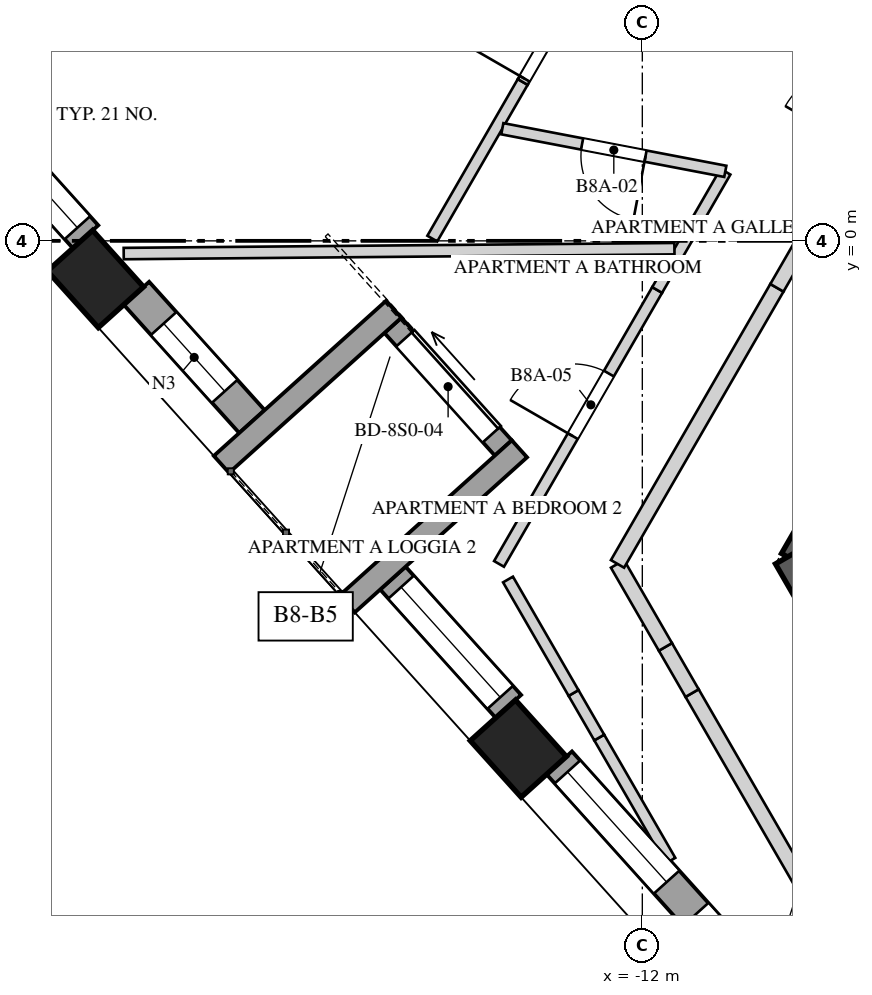
"""IFC4 building model, lengths in metres.
Left out: names, types, materials, properties, quantities, classifications, styles, units other than length and angle.
Written with IfcOpenShell. Run it as: python <this file> out.ifc"""

import sys

from ifc_helpers import new_model, si_unit, direction, frame, frame_2d, origin, origin_2d, place, context, subcontext, project, spatial, polyline, rectangle, outline, extrude, element, fill, save


model = new_model("IFC4")
c1 = context("Model", 3, precision=1e-05, world=origin(), true_north=direction((0.0, 1.0)))
c2 = subcontext(c1, "Body", "Model", "MODEL_VIEW")
j1 = project(units=[si_unit("LENGTHUNIT", "METRE"), si_unit("PLANEANGLEUNIT", "RADIAN")], contexts=[c1])
p1 = place(None, origin())
s1 = spatial("IfcSite", under=j1, at=p1, CompositionType="ELEMENT")
p2 = place(p1, origin())
s2 = spatial("IfcBuilding", under=s1, at=p2, CompositionType="ELEMENT")
p3 = place(p2, frame((0.0, 0.0, 320.4)))
s3 = spatial("IfcBuildingStorey", under=s2, at=p3, CompositionType="ELEMENT", Elevation=320.4)
p4 = place(p3, frame((-1.285, 10.725, 0.0), z_axis=(0.0, 0.0, 1.0), x_axis=(-0.499994590896, -0.86602852671, 0.0)))
e1 = element("IfcWall", 1, at=p4, inside=s3, PredefinedType="SHEAR", context=c2, shape_type="SweptSolid", body=[
    extrude(rectangle(XDim=17.292, YDim=0.55, at=frame_2d((8.646, 0.0))), origin(), (0.0, 0.0, 1.0), 4.0),
])
p5 = place(p4, frame((6.851, 0.0, 0.0)))
e2 = element("IfcOpeningElement", 2, at=p5, cuts=e1, PredefinedType="OPENING", context=c2, shape_type="SweptSolid", body=[
    extrude(rectangle(XDim=1.0, YDim=2.4, at=frame_2d((0.5, 1.2))), frame((0.0, 0.285, 0.0), z_axis=(0.0, -1.0, 0.0), x_axis=(1.0, 0.0, 0.0)), (0.0, 0.0, 1.0), 0.57),
])
p6 = place(p4, frame((15.089, 0.0, 0.0)))
e3 = element("IfcOpeningElement", 3, at=p6, cuts=e1, PredefinedType="OPENING", context=c2, shape_type="SweptSolid", body=[
    extrude(rectangle(XDim=0.8, YDim=2.1, at=frame_2d((0.4, 1.05))), frame((0.0, 0.285, 0.0), z_axis=(0.0, -1.0, 0.0), x_axis=(1.0, 0.0, 0.0)), (0.0, 0.0, 1.0), 0.57),
])
p7 = place(p3, frame((-10.01, -4.113, 0.0), z_axis=(0.0, 0.0, 1.0), x_axis=(0.499995765644, -0.866027848477, 0.0)))
e4 = element("IfcWall", 4, at=p7, inside=s3, PredefinedType="SHEAR", context=c2, shape_type="SweptSolid", body=[
    extrude(rectangle(XDim=2.887, YDim=0.55, at=frame_2d((1.443, 0.0))), origin(), (0.0, 0.0, 1.0), 4.0),
])
for number, where, z_axis, x_axis in (
    (5, (-19.195, -0.502, -0.35), (0.0, 0.0, 1.0), (0.669, -0.743, 0.0)),
    (6, (-13.631, -6.68, -0.35), (0.0, 0.0, 1.0), (0.669, -0.743, 0.0)),
):
    element("IfcColumn", number, at=place(p3, frame(where, z_axis=z_axis, x_axis=x_axis)), inside=s3, PredefinedType="COLUMN", context=c2, shape_type="SweptSolid", body=[
        extrude(rectangle(XDim=1.0, YDim=0.8, at=origin_2d()), origin(), (0.0, 0.0, 1.0), 4.35),
    ])
p8 = place(p3, frame((-20.844, 1.742, 0.0), z_axis=(0.0, 0.0, 1.0), x_axis=(0.669160694992, -0.743117732447, 0.0)))
e7 = element("IfcWall", 7, at=p8, inside=s3, PredefinedType="SOLIDWALL", context=c2, shape_type="SweptSolid", body=[
    extrude(rectangle(XDim=2.271, YDim=0.45, at=frame_2d((1.136, 0.0))), origin(), (0.0, 0.0, 1.0), 3.3),
])
p9 = place(p8, frame((0.161, 0.0, 0.4)))
e8 = element("IfcOpeningElement", 8, at=p9, cuts=e7, PredefinedType="OPENING", context=c2, shape_type="SweptSolid", body=[
    extrude(rectangle(XDim=1.95, YDim=2.75, at=frame_2d((0.975, 1.375))), frame((0.0, 0.235, 0.0), z_axis=(0.0, -1.0, 0.0), x_axis=(1.0, 0.0, 0.0)), (0.0, 0.0, 1.0), 0.47),
])
p10 = place(p3, frame((-18.656, -0.689, 0.0), z_axis=(0.0, 0.0, 1.0), x_axis=(0.669107243666, -0.743165860676, 0.0)))
e9 = element("IfcWall", 9, at=p10, inside=s3, PredefinedType="SOLIDWALL", context=c2, shape_type="SweptSolid", body=[
    extrude(rectangle(XDim=2.271, YDim=0.45, at=frame_2d((1.136, 0.0))), origin(), (0.0, 0.0, 1.0), 3.3),
])
p11 = place(p10, frame((0.536, 0.0, 0.4)))
e10 = element("IfcOpeningElement", 10, at=p11, cuts=e9, PredefinedType="OPENING", context=c2, shape_type="SweptSolid", body=[
    extrude(rectangle(XDim=1.2, YDim=2.75, at=frame_2d((0.6, 1.375))), frame((0.0, 0.235, 0.0), z_axis=(0.0, -1.0, 0.0), x_axis=(1.0, 0.0, 0.0)), (0.0, 0.0, 1.0), 0.47),
])
p12 = place(p3, frame((-15.281, -4.437, 0.0), z_axis=(0.0, 0.0, 1.0), x_axis=(0.669107243666, -0.743165860676, 0.0)))
e11 = element("IfcWall", 11, at=p12, inside=s3, PredefinedType="SOLIDWALL", context=c2, shape_type="SweptSolid", body=[
    extrude(rectangle(XDim=2.271, YDim=0.45, at=frame_2d((1.136, 0.0))), origin(), (0.0, 0.0, 1.0), 3.3),
])
p13 = place(p12, frame((0.161, 0.0, 0.4)))
e12 = element("IfcOpeningElement", 12, at=p13, cuts=e11, PredefinedType="OPENING", context=c2, shape_type="SweptSolid", body=[
    extrude(rectangle(XDim=1.95, YDim=2.75, at=frame_2d((0.975, 1.375))), frame((0.0, 0.235, 0.0), z_axis=(0.0, -1.0, 0.0), x_axis=(1.0, 0.0, 0.0)), (0.0, 0.0, 1.0), 0.47),
])
p14 = place(p3, frame((-13.093, -6.868, 0.0), z_axis=(0.0, 0.0, 1.0), x_axis=(0.669136224502, -0.74313976684, 0.0)))
e13 = element("IfcWall", 13, at=p14, inside=s3, PredefinedType="SOLIDWALL", context=c2, shape_type="SweptSolid", body=[
    extrude(rectangle(XDim=7.314, YDim=0.45, at=frame_2d((3.657, 0.0))), origin(), (0.0, 0.0, 1.0), 3.3),
])
p15 = place(p14, frame((0.161, 0.0, 0.4)))
e14 = element("IfcOpeningElement", 14, at=p15, cuts=e13, PredefinedType="OPENING", context=c2, shape_type="SweptSolid", body=[
    extrude(rectangle(XDim=1.95, YDim=2.75, at=frame_2d((0.975, 1.375))), frame((0.0, 0.235, 0.0), z_axis=(0.0, -1.0, 0.0), x_axis=(1.0, 0.0, 0.0)), (0.0, 0.0, 1.0), 0.47),
])
p16 = place(p14, frame((2.682, 0.0, 0.4)))
e15 = element("IfcOpeningElement", 15, at=p16, cuts=e13, PredefinedType="OPENING", context=c2, shape_type="SweptSolid", body=[
    extrude(rectangle(XDim=1.95, YDim=2.75, at=frame_2d((0.975, 1.375))), frame((0.0, 0.235, 0.0), z_axis=(0.0, -1.0, 0.0), x_axis=(1.0, 0.0, 0.0)), (0.0, 0.0, 1.0), 0.47),
])
p17 = place(p14, frame((5.203, 0.0, 0.4)))
e16 = element("IfcOpeningElement", 16, at=p17, cuts=e13, PredefinedType="OPENING", context=c2, shape_type="SweptSolid", body=[
    extrude(rectangle(XDim=1.95, YDim=2.75, at=frame_2d((0.975, 1.375))), frame((0.0, 0.235, 0.0), z_axis=(0.0, -1.0, 0.0), x_axis=(1.0, 0.0, 0.0)), (0.0, 0.0, 1.0), 0.47),
])
p18 = place(p3, frame((-21.447, 1.402, 0.0), z_axis=(0.0, 0.0, 1.0), x_axis=(0.743158802514, 0.669115082961, 0.0)))
e17 = element("IfcWall", 17, at=p18, inside=s3, PredefinedType="SOLIDWALL", context=c2, shape_type="SweptSolid", body=[
    extrude(rectangle(XDim=3.05, YDim=0.3, at=frame_2d((1.525, 0.0))), origin(), (0.0, 0.0, 1.0), 3.3),
])
p19 = place(p3, frame((-15.281, -1.111, 0.0), z_axis=(0.0, 0.0, 1.0), x_axis=(0.669144868344, -0.743131983681, 0.0)))
e18 = element("IfcWall", 18, at=p19, inside=s3, PredefinedType="SOLIDWALL", context=c2, shape_type="SweptSolid", body=[
    extrude(rectangle(XDim=2.171, YDim=0.3, at=frame_2d((1.085, 0.0))), origin(), (0.0, 0.0, 1.0), 3.3),
])
p20 = place(p19, frame((0.236, 0.0, 0.0)))
e19 = element("IfcOpeningElement", 19, at=p20, cuts=e18, PredefinedType="OPENING", context=c2, shape_type="SweptSolid", body=[
    extrude(rectangle(XDim=1.7, YDim=2.5, at=frame_2d((0.85, 1.25))), frame((0.0, 0.16, 0.0), z_axis=(0.0, -1.0, 0.0), x_axis=(1.0, 0.0, 0.0)), (0.0, 0.0, 1.0), 0.32),
])
p21 = place(p3, frame((-17.537, -2.94, 0.0), z_axis=(0.0, 0.0, 1.0), x_axis=(0.743118999127, 0.669159288314, 0.0)))
e20 = element("IfcWall", 20, at=p21, inside=s3, PredefinedType="SOLIDWALL", context=c2, shape_type="SweptSolid", body=[
    extrude(rectangle(XDim=3.05, YDim=0.3, at=frame_2d((1.525, 0.0))), origin(), (0.0, 0.0, 1.0), 3.3),
])
p22 = place(p3, frame((-15.883, -4.777, 0.0), z_axis=(0.0, 0.0, 1.0), x_axis=(0.743122960955, 0.669154888573, 0.0)))
e21 = element("IfcWall", 21, at=p22, inside=s3, PredefinedType="SOLIDWALL", context=c2, shape_type="SweptSolid", body=[
    extrude(rectangle(XDim=3.05, YDim=0.3, at=frame_2d((1.525, 0.0))), origin(), (0.0, 0.0, 1.0), 3.3),
])
p23 = place(p3, frame((-14.763, 0.03, 0.0), z_axis=(0.0, 0.0, 1.0), x_axis=(0.500045118629, 0.865999352965, 0.0)))
e22 = element("IfcWall", 22, at=p23, inside=s3, PredefinedType="PARTITIONING", context=c2, shape_type="SweptSolid", body=[
    extrude(rectangle(XDim=2.38, YDim=0.15, at=frame_2d((1.19, 0.0))), origin(), (0.0, 0.0, 1.0), 3.65),
])
p24 = place(p3, frame((-13.573, 2.09, 0.0), z_axis=(0.0, 0.0, 1.0), x_axis=(0.500026194733, 0.86601027972, 0.0)))
e23 = element("IfcWall", 23, at=p24, inside=s3, PredefinedType="PARTITIONING", context=c2, shape_type="SweptSolid", body=[
    extrude(outline(polyline([(0.0, 0.0), (1.392, 0.0), (1.392, 2.55), (0.474, 2.55), (0.474, 3.65), (0.0, 3.65), (0.0, 0.0)])), frame((0.0, 0.075, 0.0), z_axis=(0.0, -1.0, 0.0), x_axis=(1.0, 0.0, 0.0)), (0.0, 0.0, 1.0), 0.15),
])
p25 = place(p24, frame((0.05, 0.0, 0.0)))
e24 = element("IfcOpeningElement", 24, at=p25, cuts=e23, PredefinedType="OPENING", context=c2, shape_type="SweptSolid", body=[
    extrude(rectangle(XDim=0.95, YDim=2.4, at=frame_2d((0.475, 1.2))), frame((0.0, 0.085, 0.0), z_axis=(0.0, -1.0, 0.0), x_axis=(1.0, 0.0, 0.0)), (0.0, 0.0, 1.0), 0.17),
])
p26 = place(p3, frame((-13.885, -4.25, 0.0), z_axis=(0.0, 0.0, 1.0), x_axis=(0.499988236992, 0.866032195053, 0.0)))
e25 = element("IfcWall", 25, at=p26, inside=s3, PredefinedType="PARTITIONING", context=c2, shape_type="SweptSolid", body=[
    extrude(rectangle(XDim=4.161, YDim=0.15, at=frame_2d((2.081, 0.0))), origin(), (0.0, 0.0, 1.0), 3.65),
])
p27 = place(p26, frame((1.941, 0.0, 0.0)))
e26 = element("IfcOpeningElement", 26, at=p27, cuts=e25, PredefinedType="OPENING", context=c2, shape_type="SweptSolid", body=[
    extrude(rectangle(XDim=0.95, YDim=2.4, at=frame_2d((0.475, 1.2))), frame((0.0, 0.085, 0.0), z_axis=(0.0, -1.0, 0.0), x_axis=(1.0, 0.0, 0.0)), (0.0, 0.0, 1.0), 0.17),
])
p28 = place(p3, frame((-11.805, -0.646, 0.0), z_axis=(0.0, 0.0, 1.0), x_axis=(0.500185116612, 0.865918500276, 0.0)))
e27 = element("IfcWall", 27, at=p28, inside=s3, PredefinedType="PARTITIONING", context=c2, shape_type="SweptSolid", body=[
    extrude(rectangle(XDim=0.792, YDim=0.15, at=frame_2d((0.396, 0.0))), origin(), (0.0, 0.0, 1.0), 2.95),
])
p29 = place(p3, frame((-11.409, 0.039, 0.0), z_axis=(0.0, 0.0, 1.0), x_axis=(0.49984860601, 0.866112793503, 0.0)))
e28 = element("IfcWall", 28, at=p29, inside=s3, PredefinedType="PARTITIONING", context=c2, shape_type="SweptSolid", body=[
    extrude(rectangle(XDim=1.005, YDim=0.15, at=frame_2d((0.502, 0.0))), origin(), (0.0, 0.0, 1.0), 3.65),
])
p30 = place(p3, frame((-11.631, -8.155, 0.0), z_axis=(0.0, 0.0, 1.0), x_axis=(-0.50011020776, 0.865961765954, 0.0)))
e29 = element("IfcWall", 29, at=p30, inside=s3, PredefinedType="PARTITIONING", context=c2, shape_type="SweptSolid", body=[
    extrude(rectangle(XDim=1.871, YDim=0.15, at=frame_2d((0.936, 0.0))), origin(), (0.0, 0.0, 1.0), 3.65),
])
p31 = place(p3, frame((-12.567, -6.534, 0.0), z_axis=(0.0, 0.0, 1.0), x_axis=(-0.499826590014, 0.866125498941, 0.0)))
e30 = element("IfcWall", 30, at=p31, inside=s3, PredefinedType="PARTITIONING", context=c2, shape_type="SweptSolid", body=[
    extrude(rectangle(XDim=0.677, YDim=0.15, at=frame_2d((0.338, 0.0))), origin(), (0.0, 0.0, 1.0), 2.95),
])
p32 = place(p3, frame((-12.905, -5.948, 0.0), z_axis=(0.0, 0.0, 1.0), x_axis=(-0.499992114976, 0.866029956157, 0.0)))
e31 = element("IfcWall", 31, at=p32, inside=s3, PredefinedType="PARTITIONING", context=c2, shape_type="SweptSolid", body=[
    extrude(rectangle(XDim=1.724, YDim=0.15, at=frame_2d((0.862, 0.0))), origin(), (0.0, 0.0, 1.0), 3.65),
])
p33 = place(p3, frame((-11.577, -0.103, 0.0), z_axis=(0.0, 0.0, 1.0), x_axis=(-0.999960434916, -0.008895425913, 0.0)))
e32 = element("IfcWall", 32, at=p33, inside=s3, PredefinedType="PARTITIONING", context=c2, shape_type="SweptSolid", body=[
    extrude(rectangle(XDim=7.246, YDim=0.15, at=frame_2d((3.623, 0.0))), origin(), (0.0, 0.0, 1.0), 2.95),
])
p34 = place(p3, frame((-10.908, 0.914, 0.0), z_axis=(0.0, 0.0, 1.0), x_axis=(-0.982214575518, 0.187761890809, 0.0)))
e33 = element("IfcWall", 33, at=p34, inside=s3, PredefinedType="PARTITIONING", context=c2, shape_type="SweptSolid", body=[
    extrude(rectangle(XDim=2.987, YDim=0.15, at=frame_2d((1.493, 0.0))), origin(), (0.0, 0.0, 1.0), 3.65),
])
p35 = place(p34, frame((1.068, 0.0, 0.0)))
e34 = element("IfcOpeningElement", 34, at=p35, cuts=e33, PredefinedType="OPENING", context=c2, shape_type="SweptSolid", body=[
    extrude(rectangle(XDim=0.85, YDim=2.4, at=frame_2d((0.425, 1.2))), frame((0.0, 0.085, 0.0), z_axis=(0.0, -1.0, 0.0), x_axis=(1.0, 0.0, 0.0)), (0.0, 0.0, 1.0), 0.17),
])
p36 = place(p3, frame((-9.844, -8.55, 0.0), z_axis=(0.0, 0.0, 1.0), x_axis=(-0.500003959331, 0.866023117852, 0.0)))
e35 = element("IfcWall", 35, at=p36, inside=s3, PredefinedType="SOLIDWALL", context=c2, shape_type="SweptSolid", body=[
    extrude(rectangle(XDim=3.003, YDim=0.2, at=frame_2d((1.501, 0.0))), origin(), (0.0, 0.0, 1.0), 3.65),
])
p37 = place(p3, frame((-11.345, -5.949, 0.0), z_axis=(0.0, 0.0, 1.0), x_axis=(-0.499993523031, 0.866029143232, 0.0)))
e36 = element("IfcWall", 36, at=p37, inside=s3, PredefinedType="SOLIDWALL", context=c2, shape_type="SweptSolid", body=[
    extrude(rectangle(XDim=0.702, YDim=0.2, at=frame_2d((0.351, 0.0))), origin(), (0.0, 0.0, 1.0), 2.95),
])
p38 = place(p3, frame((-11.696, -5.342, 0.0), z_axis=(0.0, 0.0, 1.0), x_axis=(-0.500013012896, 0.866017890655, 0.0)))
e37 = element("IfcWall", 37, at=p38, inside=s3, PredefinedType="SOLIDWALL", context=c2, shape_type="SweptSolid", body=[
    extrude(rectangle(XDim=1.261, YDim=0.2, at=frame_2d((0.63, 0.0))), origin(), (0.0, 0.0, 1.0), 3.65),
])
p39 = place(p3, frame((-12.326, -4.25, 0.0), z_axis=(0.0, 0.0, 1.0), x_axis=(0.499982771656, 0.866035350345, 0.0)))
e38 = element("IfcWall", 38, at=p39, inside=s3, PredefinedType="SOLIDWALL", context=c2, shape_type="SweptSolid", body=[
    extrude(rectangle(XDim=4.195, YDim=0.2, at=frame_2d((2.097, 0.0))), origin(), (0.0, 0.0, 1.0), 3.65),
])
p40 = place(p3, frame((-10.229, -0.617, 0.0), z_axis=(0.0, 0.0, 1.0), x_axis=(0.5001686003, 0.865928040471, 0.0)))
e39 = element("IfcWall", 39, at=p40, inside=s3, PredefinedType="SOLIDWALL", context=c2, shape_type="SweptSolid", body=[
    extrude(rectangle(XDim=0.821, YDim=0.2, at=frame_2d((0.411, 0.0))), origin(), (0.0, 0.0, 1.0), 2.95),
])
p41 = place(p9, origin())
e40 = element("IfcWindow", 40, at=p41, inside=s3, PartitioningType="SINGLE_PANEL", PredefinedType="WINDOW", context=c2, shape_type="SweptSolid", body=[
    extrude(rectangle(XDim=1.95, YDim=2.75, at=frame_2d((0.975, 1.375))), frame((0.0, 0.03, 0.0), z_axis=(0.0, -1.0, 0.0), x_axis=(1.0, 0.0, 0.0)), (0.0, 0.0, 1.0), 0.06),
])
fill(e8, e40)
p42 = place(p11, origin())
e41 = element("IfcWindow", 41, at=p42, inside=s3, PartitioningType="SINGLE_PANEL", PredefinedType="WINDOW", context=c2, shape_type="SweptSolid", body=[
    extrude(rectangle(XDim=1.2, YDim=2.75, at=frame_2d((0.6, 1.375))), frame((0.0, 0.03, 0.0), z_axis=(0.0, -1.0, 0.0), x_axis=(1.0, 0.0, 0.0)), (0.0, 0.0, 1.0), 0.06),
])
fill(e10, e41)
p43 = place(p13, origin())
e42 = element("IfcWindow", 42, at=p43, inside=s3, PartitioningType="SINGLE_PANEL", PredefinedType="WINDOW", context=c2, shape_type="SweptSolid", body=[
    extrude(rectangle(XDim=1.95, YDim=2.75, at=frame_2d((0.975, 1.375))), frame((0.0, 0.03, 0.0), z_axis=(0.0, -1.0, 0.0), x_axis=(1.0, 0.0, 0.0)), (0.0, 0.0, 1.0), 0.06),
])
fill(e12, e42)
p44 = place(p15, origin())
e43 = element("IfcWindow", 43, at=p44, inside=s3, PartitioningType="SINGLE_PANEL", PredefinedType="WINDOW", context=c2, shape_type="SweptSolid", body=[
    extrude(rectangle(XDim=1.95, YDim=2.75, at=frame_2d((0.975, 1.375))), frame((0.0, 0.03, 0.0), z_axis=(0.0, -1.0, 0.0), x_axis=(1.0, 0.0, 0.0)), (0.0, 0.0, 1.0), 0.06),
])
fill(e14, e43)
p45 = place(p16, origin())
e44 = element("IfcWindow", 44, at=p45, inside=s3, PartitioningType="SINGLE_PANEL", PredefinedType="WINDOW", context=c2, shape_type="SweptSolid", body=[
    extrude(rectangle(XDim=1.95, YDim=2.75, at=frame_2d((0.975, 1.375))), frame((0.0, 0.03, 0.0), z_axis=(0.0, -1.0, 0.0), x_axis=(1.0, 0.0, 0.0)), (0.0, 0.0, 1.0), 0.06),
])
fill(e15, e44)
p46 = place(p20, origin())
e45 = element("IfcDoor", 45, at=p46, inside=s3, OperationType="SLIDING_TO_LEFT", PredefinedType="DOOR", context=c2, shape_type="SweptSolid", body=[
    extrude(rectangle(XDim=1.7, YDim=2.5, at=frame_2d((0.85, 1.25))), frame((0.0, 0.025, 0.0), z_axis=(0.0, -1.0, 0.0), x_axis=(1.0, 0.0, 0.0)), (0.0, 0.0, 1.0), 0.05),
])
fill(e19, e45)
p47 = place(p35, origin())
e46 = element("IfcDoor", 46, at=p47, inside=s3, OperationType="SINGLE_SWING_RIGHT", PredefinedType="DOOR", context=c2, shape_type="SweptSolid", body=[
    extrude(rectangle(XDim=0.85, YDim=2.4, at=frame_2d((0.425, 1.2))), frame((0.0, 0.025, 0.0), z_axis=(0.0, -1.0, 0.0), x_axis=(1.0, 0.0, 0.0)), (0.0, 0.0, 1.0), 0.05),
])
fill(e34, e46)
p48 = place(p25, origin())
e47 = element("IfcDoor", 47, at=p48, inside=s3, OperationType="SINGLE_SWING_LEFT", PredefinedType="DOOR", context=c2, shape_type="SweptSolid", body=[
    extrude(rectangle(XDim=0.95, YDim=2.4, at=frame_2d((0.475, 1.2))), frame((0.0, 0.025, 0.0), z_axis=(0.0, -1.0, 0.0), x_axis=(1.0, 0.0, 0.0)), (0.0, 0.0, 1.0), 0.05),
])
fill(e24, e47)
p49 = place(p27, origin())
e48 = element("IfcDoor", 48, at=p49, inside=s3, OperationType="SINGLE_SWING_LEFT", PredefinedType="DOOR", context=c2, shape_type="SweptSolid", body=[
    extrude(rectangle(XDim=0.95, YDim=2.4, at=frame_2d((0.475, 1.2))), frame((0.0, 0.025, 0.0), z_axis=(0.0, -1.0, 0.0), x_axis=(1.0, 0.0, 0.0)), (0.0, 0.0, 1.0), 0.05),
])
fill(e26, e48)
save(model, sys.argv[1])
